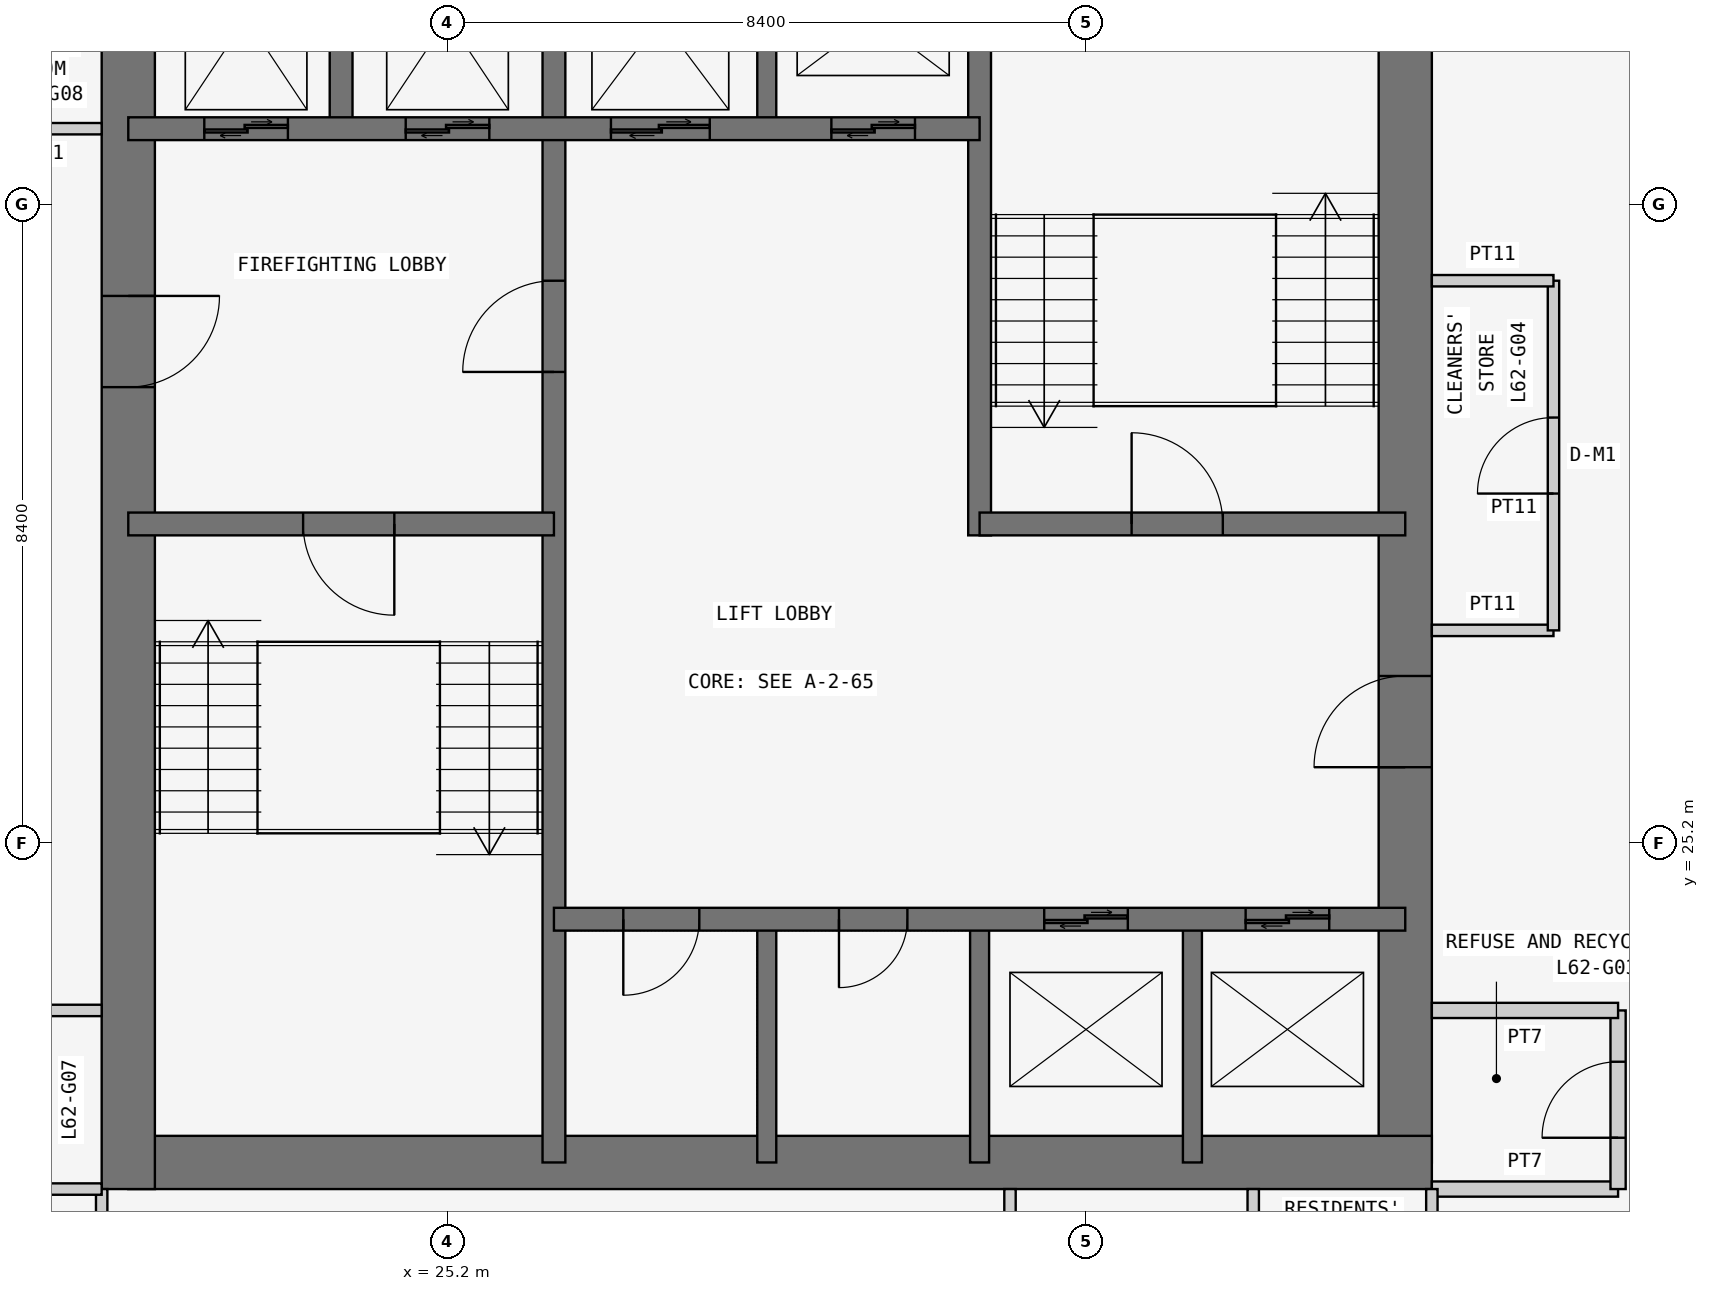
"""IFC4 building model, lengths in metres.
Left out: names, types, materials, properties, quantities, classifications, styles, units other than length and angle.
Written with IfcOpenShell. Run it as: python <this file> out.ifc"""

import sys

from ifc_helpers import new_model, si_unit, direction, frame, frame_2d, origin, place, context, subcontext, project, spatial, rectangle, extrude, element, fill, save


model = new_model("IFC4")
c1 = context("Model", 3, precision=1e-05, world=origin(), true_north=direction((0.0, 1.0)))
c2 = subcontext(c1, "Body", "Model", "MODEL_VIEW")
j1 = project(units=[si_unit("LENGTHUNIT", "METRE"), si_unit("PLANEANGLEUNIT", "RADIAN")], contexts=[c1])
p1 = place(None, origin())
s1 = spatial("IfcSite", under=j1, at=p1, CompositionType="ELEMENT")
p2 = place(p1, origin())
s2 = spatial("IfcBuilding", under=s1, at=p2, CompositionType="ELEMENT")
p3 = place(p2, frame((0.0, 0.0, 237.3)))
s3 = spatial("IfcBuildingStorey", under=s2, at=p3, CompositionType="ELEMENT", Elevation=237.3)
p4 = place(p3, frame((21.0, 21.0, 0.0), z_axis=(0.0, 0.0, 1.0), x_axis=(1.0, 0.0, 0.0)))
e1 = element("IfcWall", 1, at=p4, inside=s3, PredefinedType="SHEAR", context=c2, shape_type="SweptSolid", body=[
    extrude(rectangle(XDim=17.15, YDim=0.7, at=frame_2d((8.575, 0.0))), origin(), (0.0, 0.0, 1.0), 3.6),
])
p5 = place(p3, frame((37.8, 21.0, 0.0), z_axis=(0.0, 0.0, 1.0), x_axis=(0.0, 1.0, 0.0)))
e2 = element("IfcWall", 2, at=p5, inside=s3, PredefinedType="SHEAR", context=c2, shape_type="SweptSolid", body=[
    extrude(rectangle(XDim=17.15, YDim=0.7, at=frame_2d((8.575, 0.0))), origin(), (0.0, 0.0, 1.0), 3.6),
])
p6 = place(p5, frame((5.2, 0.0, 0.0)))
e3 = element("IfcOpeningElement", 3, at=p6, cuts=e2, PredefinedType="OPENING", context=c2, shape_type="SweptSolid", body=[
    extrude(rectangle(XDim=1.2, YDim=2.1, at=frame_2d((0.6, 1.05))), frame((0.0, 0.36, 0.0), z_axis=(0.0, -1.0, 0.0), x_axis=(1.0, 0.0, 0.0)), (0.0, 0.0, 1.0), 0.72),
])
p7 = place(p3, frame((21.0, 37.8, 0.0), z_axis=(0.0, 0.0, 1.0), x_axis=(0.0, -1.0, 0.0)))
e4 = element("IfcWall", 4, at=p7, inside=s3, PredefinedType="SHEAR", context=c2, shape_type="SweptSolid", body=[
    extrude(rectangle(XDim=17.15, YDim=0.7, at=frame_2d((8.575, 0.0))), origin(), (0.0, 0.0, 1.0), 3.6),
])
p8 = place(p7, frame((5.4, 0.0, 0.0)))
e5 = element("IfcOpeningElement", 5, at=p8, cuts=e4, PredefinedType="OPENING", context=c2, shape_type="SweptSolid", body=[
    extrude(rectangle(XDim=1.2, YDim=2.1, at=frame_2d((0.6, 1.05))), frame((0.0, 0.36, 0.0), z_axis=(0.0, -1.0, 0.0), x_axis=(1.0, 0.0, 0.0)), (0.0, 0.0, 1.0), 0.72),
])
p9 = place(p3, frame((26.6, 21.0, 0.0), z_axis=(0.0, 0.0, 1.0), x_axis=(0.0, 1.0, 0.0)))
e6 = element("IfcWall", 6, at=p9, inside=s3, PredefinedType="SHEAR", context=c2, shape_type="SweptSolid", body=[
    extrude(rectangle(XDim=16.8, YDim=0.3, at=frame_2d((8.4, 0.0))), origin(), (0.0, 0.0, 1.0), 3.6),
])
p10 = place(p9, frame((10.4, 0.0, 0.0)))
e7 = element("IfcOpeningElement", 7, at=p10, cuts=e6, PredefinedType="OPENING", context=c2, shape_type="SweptSolid", body=[
    extrude(rectangle(XDim=1.2, YDim=2.1, at=frame_2d((0.6, 1.05))), frame((0.0, 0.16, 0.0), z_axis=(0.0, -1.0, 0.0), x_axis=(1.0, 0.0, 0.0)), (0.0, 0.0, 1.0), 0.32),
])
p11 = place(p3, frame((21.0, 29.4, 0.0), z_axis=(0.0, 0.0, 1.0), x_axis=(1.0, 0.0, 0.0)))
e8 = element("IfcWall", 8, at=p11, inside=s3, PredefinedType="SHEAR", context=c2, shape_type="SweptSolid", body=[
    extrude(rectangle(XDim=5.6, YDim=0.3, at=frame_2d((2.8, 0.0))), origin(), (0.0, 0.0, 1.0), 3.6),
])
p12 = place(p11, frame((2.3, 0.0, 0.0)))
e9 = element("IfcOpeningElement", 9, at=p12, cuts=e8, PredefinedType="OPENING", context=c2, shape_type="SweptSolid", body=[
    extrude(rectangle(XDim=1.2, YDim=2.1, at=frame_2d((0.6, 1.05))), frame((0.0, 0.16, 0.0), z_axis=(0.0, -1.0, 0.0), x_axis=(1.0, 0.0, 0.0)), (0.0, 0.0, 1.0), 0.32),
])
p13 = place(p3, frame((21.0, 34.6, 0.0), z_axis=(0.0, 0.0, 1.0), x_axis=(1.0, 0.0, 0.0)))
e10 = element("IfcWall", 10, at=p13, inside=s3, PredefinedType="SHEAR", context=c2, shape_type="SweptSolid", body=[
    extrude(rectangle(XDim=11.2, YDim=0.3, at=frame_2d((5.6, 0.0))), origin(), (0.0, 0.0, 1.0), 3.6),
])
p14 = place(p13, frame((9.25, 0.0, 0.0)))
e11 = element("IfcOpeningElement", 11, at=p14, cuts=e10, PredefinedType="OPENING", context=c2, shape_type="SweptSolid", body=[
    extrude(rectangle(XDim=1.1, YDim=2.1, at=frame_2d((0.55, 1.05))), frame((0.0, 0.16, 0.0), z_axis=(0.0, -1.0, 0.0), x_axis=(1.0, 0.0, 0.0)), (0.0, 0.0, 1.0), 0.32),
])
p15 = place(p13, frame((1.0, 0.0, 0.0)))
e12 = element("IfcOpeningElement", 12, at=p15, cuts=e10, PredefinedType="OPENING", context=c2, shape_type="SweptSolid", body=[
    extrude(rectangle(XDim=1.1, YDim=2.1, at=frame_2d((0.55, 1.05))), frame((0.0, 0.16, 0.0), z_axis=(0.0, -1.0, 0.0), x_axis=(1.0, 0.0, 0.0)), (0.0, 0.0, 1.0), 0.32),
])
p16 = place(p13, frame((3.65, 0.0, 0.0)))
e13 = element("IfcOpeningElement", 13, at=p16, cuts=e10, PredefinedType="OPENING", context=c2, shape_type="SweptSolid", body=[
    extrude(rectangle(XDim=1.1, YDim=2.1, at=frame_2d((0.55, 1.05))), frame((0.0, 0.16, 0.0), z_axis=(0.0, -1.0, 0.0), x_axis=(1.0, 0.0, 0.0)), (0.0, 0.0, 1.0), 0.32),
])
p17 = place(p13, frame((6.35, 0.0, 0.0)))
e14 = element("IfcOpeningElement", 14, at=p17, cuts=e10, PredefinedType="OPENING", context=c2, shape_type="SweptSolid", body=[
    extrude(rectangle(XDim=1.3, YDim=2.1, at=frame_2d((0.65, 1.05))), frame((0.0, 0.16, 0.0), z_axis=(0.0, -1.0, 0.0), x_axis=(1.0, 0.0, 0.0)), (0.0, 0.0, 1.0), 0.32),
])
p18 = place(p3, frame((23.8, 34.6, 0.0), z_axis=(0.0, 0.0, 1.0), x_axis=(0.0, 1.0, 0.0)))
e15 = element("IfcWall", 15, at=p18, inside=s3, PredefinedType="SHEAR", context=c2, shape_type="SweptSolid", body=[
    extrude(rectangle(XDim=3.2, YDim=0.3, at=frame_2d((1.6, 0.0))), origin(), (0.0, 0.0, 1.0), 3.6),
])
p19 = place(p3, frame((26.6, 24.2, 0.0), z_axis=(0.0, 0.0, 1.0), x_axis=(1.0, 0.0, 0.0)))
e16 = element("IfcWall", 16, at=p19, inside=s3, PredefinedType="SHEAR", context=c2, shape_type="SweptSolid", body=[
    extrude(rectangle(XDim=11.2, YDim=0.3, at=frame_2d((5.6, 0.0))), origin(), (0.0, 0.0, 1.0), 3.6),
])
p20 = place(p19, frame((0.913, 0.0, 0.0)))
e17 = element("IfcOpeningElement", 17, at=p20, cuts=e16, PredefinedType="OPENING", context=c2, shape_type="SweptSolid", body=[
    extrude(rectangle(XDim=1.0, YDim=2.1, at=frame_2d((0.5, 1.05))), frame((0.0, 0.16, 0.0), z_axis=(0.0, -1.0, 0.0), x_axis=(1.0, 0.0, 0.0)), (0.0, 0.0, 1.0), 0.32),
])
p21 = place(p19, frame((3.75, 0.0, 0.0)))
e18 = element("IfcOpeningElement", 18, at=p21, cuts=e16, PredefinedType="OPENING", context=c2, shape_type="SweptSolid", body=[
    extrude(rectangle(XDim=0.9, YDim=2.1, at=frame_2d((0.45, 1.05))), frame((0.0, 0.16, 0.0), z_axis=(0.0, -1.0, 0.0), x_axis=(1.0, 0.0, 0.0)), (0.0, 0.0, 1.0), 0.32),
])
p22 = place(p19, frame((6.45, 0.0, 0.0)))
e19 = element("IfcOpeningElement", 19, at=p22, cuts=e16, PredefinedType="OPENING", context=c2, shape_type="SweptSolid", body=[
    extrude(rectangle(XDim=1.1, YDim=2.1, at=frame_2d((0.55, 1.05))), frame((0.0, 0.16, 0.0), z_axis=(0.0, -1.0, 0.0), x_axis=(1.0, 0.0, 0.0)), (0.0, 0.0, 1.0), 0.32),
])
p23 = place(p19, frame((9.1, 0.0, 0.0)))
e20 = element("IfcOpeningElement", 20, at=p23, cuts=e16, PredefinedType="OPENING", context=c2, shape_type="SweptSolid", body=[
    extrude(rectangle(XDim=1.1, YDim=2.1, at=frame_2d((0.55, 1.05))), frame((0.0, 0.16, 0.0), z_axis=(0.0, -1.0, 0.0), x_axis=(1.0, 0.0, 0.0)), (0.0, 0.0, 1.0), 0.32),
])
p24 = place(p3, frame((32.2, 29.25, 0.0), z_axis=(0.0, 0.0, 1.0), x_axis=(0.0, 1.0, 0.0)))
e21 = element("IfcWall", 21, at=p24, inside=s3, PredefinedType="SHEAR", context=c2, shape_type="SweptSolid", body=[
    extrude(rectangle(XDim=8.55, YDim=0.3, at=frame_2d((4.275, 0.0))), origin(), (0.0, 0.0, 1.0), 3.6),
])
p25 = place(p3, frame((32.2, 29.4, 0.0), z_axis=(0.0, 0.0, 1.0), x_axis=(1.0, 0.0, 0.0)))
e22 = element("IfcWall", 22, at=p25, inside=s3, PredefinedType="SHEAR", context=c2, shape_type="SweptSolid", body=[
    extrude(rectangle(XDim=5.6, YDim=0.3, at=frame_2d((2.8, 0.0))), origin(), (0.0, 0.0, 1.0), 3.6),
])
p26 = place(p25, frame((2.0, 0.0, 0.0)))
e23 = element("IfcOpeningElement", 23, at=p26, cuts=e22, PredefinedType="OPENING", context=c2, shape_type="SweptSolid", body=[
    extrude(rectangle(XDim=1.2, YDim=2.1, at=frame_2d((0.6, 1.05))), frame((0.0, 0.16, 0.0), z_axis=(0.0, -1.0, 0.0), x_axis=(1.0, 0.0, 0.0)), (0.0, 0.0, 1.0), 0.32),
])
for number, where, z_axis, x_axis in (
    (24, (29.4, 21.0, 0.0), (0.0, 0.0, 1.0), (0.0, 1.0, 0.0)),
    (25, (32.2, 21.0, 0.0), (0.0, 0.0, 1.0), (0.0, 1.0, 0.0)),
    (26, (35.0, 21.0, 0.0), (0.0, 0.0, 1.0), (0.0, 1.0, 0.0)),
    (27, (29.4, 34.6, 0.0), (0.0, 0.0, 1.0), (0.0, 1.0, 0.0)),
):
    element("IfcWall", number, at=place(p3, frame(where, z_axis=z_axis, x_axis=x_axis)), inside=s3, PredefinedType="SHEAR", context=c2, shape_type="SweptSolid", body=[
        extrude(rectangle(XDim=3.2, YDim=0.25, at=frame_2d((1.6, 0.0))), origin(), (0.0, 0.0, 1.0), 3.6),
    ])
p27 = place(p3, frame((38.15, 20.65, 0.0), z_axis=(0.0, 0.0, 1.0), x_axis=(1.0, 0.0, 0.0)))
e28 = element("IfcWall", 28, at=p27, inside=s3, PredefinedType="PARTITIONING", context=c2, shape_type="SweptSolid", body=[
    extrude(rectangle(XDim=2.45, YDim=0.2, at=frame_2d((1.225, 0.0))), origin(), (0.0, 0.0, 1.0), 3.45),
])
p28 = place(p3, frame((40.6, 20.65, 0.0), z_axis=(0.0, 0.0, 1.0), x_axis=(0.0, 1.0, 0.0)))
e29 = element("IfcWall", 29, at=p28, inside=s3, PredefinedType="PARTITIONING", context=c2, shape_type="SweptSolid", body=[
    extrude(rectangle(XDim=2.35, YDim=0.2, at=frame_2d((1.175, 0.0))), origin(), (0.0, 0.0, 1.0), 3.45),
])
p29 = place(p28, frame((0.675, 0.0, 0.0)))
e30 = element("IfcOpeningElement", 30, at=p29, cuts=e29, PredefinedType="OPENING", context=c2, shape_type="SweptSolid", body=[
    extrude(rectangle(XDim=1.0, YDim=2.1, at=frame_2d((0.5, 1.05))), frame((0.0, 0.11, 0.0), z_axis=(0.0, -1.0, 0.0), x_axis=(1.0, 0.0, 0.0)), (0.0, 0.0, 1.0), 0.22),
])
p30 = place(p3, frame((40.6, 23.0, 0.0), z_axis=(0.0, 0.0, 1.0), x_axis=(-1.0, 0.0, 0.0)))
e31 = element("IfcWall", 31, at=p30, inside=s3, PredefinedType="PARTITIONING", context=c2, shape_type="SweptSolid", body=[
    extrude(rectangle(XDim=2.45, YDim=0.2, at=frame_2d((1.225, 0.0))), origin(), (0.0, 0.0, 1.0), 3.45),
])
p31 = place(p3, frame((38.15, 28.0, 0.0), z_axis=(0.0, 0.0, 1.0), x_axis=(1.0, 0.0, 0.0)))
e32 = element("IfcWall", 32, at=p31, inside=s3, PredefinedType="PARTITIONING", context=c2, shape_type="SweptSolid", body=[
    extrude(rectangle(XDim=1.6, YDim=0.15, at=frame_2d((0.8, 0.0))), origin(), (0.0, 0.0, 1.0), 3.45),
])
p32 = place(p3, frame((39.75, 28.0, 0.0), z_axis=(0.0, 0.0, 1.0), x_axis=(0.0, 1.0, 0.0)))
e33 = element("IfcWall", 33, at=p32, inside=s3, PredefinedType="PARTITIONING", context=c2, shape_type="SweptSolid", body=[
    extrude(rectangle(XDim=4.6, YDim=0.15, at=frame_2d((2.3, 0.0))), origin(), (0.0, 0.0, 1.0), 3.45),
])
p33 = place(p32, frame((1.8, 0.0, 0.0)))
e34 = element("IfcOpeningElement", 34, at=p33, cuts=e33, PredefinedType="OPENING", context=c2, shape_type="SweptSolid", body=[
    extrude(rectangle(XDim=1.0, YDim=2.1, at=frame_2d((0.5, 1.05))), frame((0.0, 0.085, 0.0), z_axis=(0.0, -1.0, 0.0), x_axis=(1.0, 0.0, 0.0)), (0.0, 0.0, 1.0), 0.17),
])
p34 = place(p3, frame((39.75, 32.6, 0.0), z_axis=(0.0, 0.0, 1.0), x_axis=(-1.0, 0.0, 0.0)))
e35 = element("IfcWall", 35, at=p34, inside=s3, PredefinedType="PARTITIONING", context=c2, shape_type="SweptSolid", body=[
    extrude(rectangle(XDim=1.6, YDim=0.15, at=frame_2d((0.8, 0.0))), origin(), (0.0, 0.0, 1.0), 3.45),
])
for number, where, z_axis, x_axis in (
    (36, (20.65, 20.65, 0.0), (0.0, 0.0, 1.0), (0.0, -1.0, 0.0)),
    (37, (32.6, 19.05, 0.0), (0.0, 0.0, 1.0), (0.0, 1.0, 0.0)),
):
    element("IfcWall", number, at=place(p3, frame(where, z_axis=z_axis, x_axis=x_axis)), inside=s3, PredefinedType="PARTITIONING", context=c2, shape_type="SweptSolid", body=[
        extrude(rectangle(XDim=1.6, YDim=0.15, at=frame_2d((0.8, 0.0))), origin(), (0.0, 0.0, 1.0), 3.45),
    ])
for number, where, z_axis, x_axis in (
    (38, (35.8, 20.65, 0.0), (0.0, 0.0, 1.0), (0.0, -1.0, 0.0)),
    (39, (38.15, 18.2, 0.0), (0.0, 0.0, 1.0), (0.0, 1.0, 0.0)),
    (40, (20.65, 23.0, 0.0), (0.0, 0.0, 1.0), (-1.0, 0.0, 0.0)),
    (41, (18.2, 20.65, 0.0), (0.0, 0.0, 1.0), (1.0, 0.0, 0.0)),
):
    element("IfcWall", number, at=place(p3, frame(where, z_axis=z_axis, x_axis=x_axis)), inside=s3, PredefinedType="PARTITIONING", context=c2, shape_type="SweptSolid", body=[
        extrude(rectangle(XDim=2.45, YDim=0.15, at=frame_2d((1.225, 0.0))), origin(), (0.0, 0.0, 1.0), 3.45),
    ])
p35 = place(p3, frame((19.05, 34.6, 0.0), z_axis=(0.0, 0.0, 1.0), x_axis=(1.0, 0.0, 0.0)))
e42 = element("IfcWall", 42, at=p35, inside=s3, PredefinedType="PARTITIONING", context=c2, shape_type="SweptSolid", body=[
    extrude(rectangle(XDim=1.6, YDim=0.15, at=frame_2d((0.8, 0.0))), origin(), (0.0, 0.0, 1.0), 3.45),
])
p36 = place(p29, origin())
e43 = element("IfcDoor", 43, at=p36, inside=s3, OperationType="SINGLE_SWING_LEFT", PredefinedType="DOOR", context=c2, shape_type="SweptSolid", body=[
    extrude(rectangle(XDim=1.0, YDim=2.1, at=frame_2d((0.5, 1.05))), frame((0.0, 0.025, 0.0), z_axis=(0.0, -1.0, 0.0), x_axis=(1.0, 0.0, 0.0)), (0.0, 0.0, 1.0), 0.05),
])
fill(e30, e43)
p37 = place(p33, origin())
e44 = element("IfcDoor", 44, at=p37, inside=s3, OperationType="SINGLE_SWING_LEFT", PredefinedType="DOOR", context=c2, shape_type="SweptSolid", body=[
    extrude(rectangle(XDim=1.0, YDim=2.1, at=frame_2d((0.5, 1.05))), frame((0.0, 0.025, 0.0), z_axis=(0.0, -1.0, 0.0), x_axis=(1.0, 0.0, 0.0)), (0.0, 0.0, 1.0), 0.05),
])
fill(e34, e44)
p38 = place(p8, origin())
e45 = element("IfcDoor", 45, at=p38, inside=s3, OperationType="SINGLE_SWING_LEFT", PredefinedType="DOOR", context=c2, shape_type="SweptSolid", body=[
    extrude(rectangle(XDim=1.2, YDim=2.1, at=frame_2d((0.6, 1.05))), frame((0.0, 0.025, 0.0), z_axis=(0.0, -1.0, 0.0), x_axis=(1.0, 0.0, 0.0)), (0.0, 0.0, 1.0), 0.05),
])
fill(e5, e45)
p39 = place(p12, frame((1.2, 0.0, 0.0), z_axis=(0.0, 0.0, 1.0), x_axis=(-1.0, 0.0, 0.0)))
e46 = element("IfcDoor", 46, at=p39, inside=s3, OperationType="SINGLE_SWING_LEFT", PredefinedType="DOOR", context=c2, shape_type="SweptSolid", body=[
    extrude(rectangle(XDim=1.2, YDim=2.1, at=frame_2d((0.6, 1.05))), frame((0.0, 0.025, 0.0), z_axis=(0.0, -1.0, 0.0), x_axis=(1.0, 0.0, 0.0)), (0.0, 0.0, 1.0), 0.05),
])
fill(e9, e46)
p40 = place(p10, origin())
e47 = element("IfcDoor", 47, at=p40, inside=s3, OperationType="SINGLE_SWING_LEFT", PredefinedType="DOOR", context=c2, shape_type="SweptSolid", body=[
    extrude(rectangle(XDim=1.2, YDim=2.1, at=frame_2d((0.6, 1.05))), frame((0.0, 0.025, 0.0), z_axis=(0.0, -1.0, 0.0), x_axis=(1.0, 0.0, 0.0)), (0.0, 0.0, 1.0), 0.05),
])
fill(e7, e47)
p41 = place(p6, origin())
e48 = element("IfcDoor", 48, at=p41, inside=s3, OperationType="SINGLE_SWING_LEFT", PredefinedType="DOOR", context=c2, shape_type="SweptSolid", body=[
    extrude(rectangle(XDim=1.2, YDim=2.1, at=frame_2d((0.6, 1.05))), frame((0.0, 0.025, 0.0), z_axis=(0.0, -1.0, 0.0), x_axis=(1.0, 0.0, 0.0)), (0.0, 0.0, 1.0), 0.05),
])
fill(e3, e48)
p42 = place(p26, origin())
e49 = element("IfcDoor", 49, at=p42, inside=s3, OperationType="SINGLE_SWING_LEFT", PredefinedType="DOOR", context=c2, shape_type="SweptSolid", body=[
    extrude(rectangle(XDim=1.2, YDim=2.1, at=frame_2d((0.6, 1.05))), frame((0.0, 0.025, 0.0), z_axis=(0.0, -1.0, 0.0), x_axis=(1.0, 0.0, 0.0)), (0.0, 0.0, 1.0), 0.05),
])
fill(e23, e49)
p43 = place(p20, frame((1.0, 0.0, 0.0), z_axis=(0.0, 0.0, 1.0), x_axis=(-1.0, 0.0, 0.0)))
e50 = element("IfcDoor", 50, at=p43, inside=s3, OperationType="SINGLE_SWING_RIGHT", PredefinedType="DOOR", context=c2, shape_type="SweptSolid", body=[
    extrude(rectangle(XDim=1.0, YDim=2.1, at=frame_2d((0.5, 1.05))), frame((0.0, 0.025, 0.0), z_axis=(0.0, -1.0, 0.0), x_axis=(1.0, 0.0, 0.0)), (0.0, 0.0, 1.0), 0.05),
])
fill(e17, e50)
p44 = place(p21, frame((0.9, 0.0, 0.0), z_axis=(0.0, 0.0, 1.0), x_axis=(-1.0, 0.0, 0.0)))
e51 = element("IfcDoor", 51, at=p44, inside=s3, OperationType="SINGLE_SWING_RIGHT", PredefinedType="DOOR", context=c2, shape_type="SweptSolid", body=[
    extrude(rectangle(XDim=0.9, YDim=2.1, at=frame_2d((0.45, 1.05))), frame((0.0, 0.025, 0.0), z_axis=(0.0, -1.0, 0.0), x_axis=(1.0, 0.0, 0.0)), (0.0, 0.0, 1.0), 0.05),
])
fill(e18, e51)
p45 = place(p22, origin())
e52 = element("IfcDoor", 52, at=p45, inside=s3, OperationType="DOUBLE_DOOR_SLIDING", PredefinedType="DOOR", context=c2, shape_type="SweptSolid", body=[
    extrude(rectangle(XDim=1.1, YDim=2.1, at=frame_2d((0.55, 1.05))), frame((0.0, 0.025, 0.0), z_axis=(0.0, -1.0, 0.0), x_axis=(1.0, 0.0, 0.0)), (0.0, 0.0, 1.0), 0.05),
])
fill(e19, e52)
p46 = place(p23, origin())
e53 = element("IfcDoor", 53, at=p46, inside=s3, OperationType="DOUBLE_DOOR_SLIDING", PredefinedType="DOOR", context=c2, shape_type="SweptSolid", body=[
    extrude(rectangle(XDim=1.1, YDim=2.1, at=frame_2d((0.55, 1.05))), frame((0.0, 0.025, 0.0), z_axis=(0.0, -1.0, 0.0), x_axis=(1.0, 0.0, 0.0)), (0.0, 0.0, 1.0), 0.05),
])
fill(e20, e53)
p47 = place(p14, origin())
e54 = element("IfcDoor", 54, at=p47, inside=s3, OperationType="DOUBLE_DOOR_SLIDING", PredefinedType="DOOR", context=c2, shape_type="SweptSolid", body=[
    extrude(rectangle(XDim=1.1, YDim=2.1, at=frame_2d((0.55, 1.05))), frame((0.0, 0.025, 0.0), z_axis=(0.0, -1.0, 0.0), x_axis=(1.0, 0.0, 0.0)), (0.0, 0.0, 1.0), 0.05),
])
fill(e11, e54)
p48 = place(p15, origin())
e55 = element("IfcDoor", 55, at=p48, inside=s3, OperationType="DOUBLE_DOOR_SLIDING", PredefinedType="DOOR", context=c2, shape_type="SweptSolid", body=[
    extrude(rectangle(XDim=1.1, YDim=2.1, at=frame_2d((0.55, 1.05))), frame((0.0, 0.025, 0.0), z_axis=(0.0, -1.0, 0.0), x_axis=(1.0, 0.0, 0.0)), (0.0, 0.0, 1.0), 0.05),
])
fill(e12, e55)
p49 = place(p16, origin())
e56 = element("IfcDoor", 56, at=p49, inside=s3, OperationType="DOUBLE_DOOR_SLIDING", PredefinedType="DOOR", context=c2, shape_type="SweptSolid", body=[
    extrude(rectangle(XDim=1.1, YDim=2.1, at=frame_2d((0.55, 1.05))), frame((0.0, 0.025, 0.0), z_axis=(0.0, -1.0, 0.0), x_axis=(1.0, 0.0, 0.0)), (0.0, 0.0, 1.0), 0.05),
])
fill(e13, e56)
p50 = place(p17, origin())
e57 = element("IfcDoor", 57, at=p50, inside=s3, OperationType="DOUBLE_DOOR_SLIDING", PredefinedType="DOOR", context=c2, shape_type="SweptSolid", body=[
    extrude(rectangle(XDim=1.3, YDim=2.1, at=frame_2d((0.65, 1.05))), frame((0.0, 0.025, 0.0), z_axis=(0.0, -1.0, 0.0), x_axis=(1.0, 0.0, 0.0)), (0.0, 0.0, 1.0), 0.05),
])
fill(e14, e57)
save(model, sys.argv[1])
